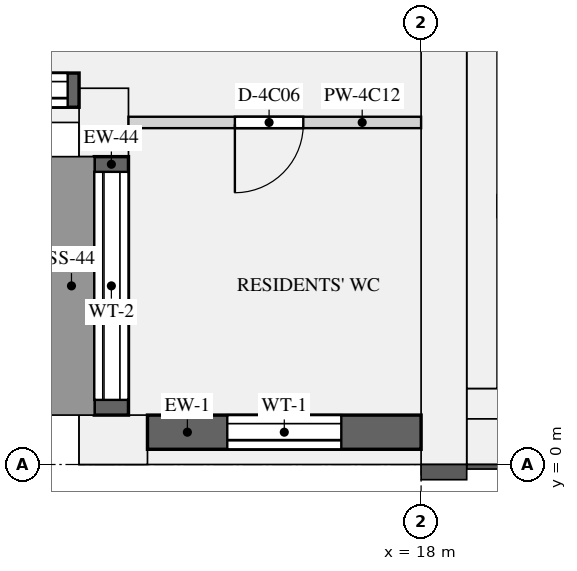
"""IFC4 building model, lengths in metres.
Left out: names, types, materials, properties, quantities, classifications, styles, units other than length and angle.
Written with IfcOpenShell. Run it as: python <this file> out.ifc"""

import sys

from ifc_helpers import new_model, si_unit, direction, frame, frame_2d, origin, origin_2d, place, context, subcontext, project, spatial, rectangle, extrude, element, fill, save


model = new_model("IFC4")
c1 = context("Model", 3, precision=1e-05, world=origin(), true_north=direction((0.0, 1.0)))
c2 = subcontext(c1, "Body", "Model", "MODEL_VIEW")
j1 = project(units=[si_unit("LENGTHUNIT", "METRE"), si_unit("PLANEANGLEUNIT", "RADIAN")], contexts=[c1])
p1 = place(None, origin())
s1 = spatial("IfcSite", under=j1, at=p1, CompositionType="ELEMENT")
p2 = place(p1, origin())
s2 = spatial("IfcBuilding", under=s1, at=p2, CompositionType="ELEMENT")
p3 = place(p2, frame((0.0, 0.0, 216.9)))
s3 = spatial("IfcBuildingStorey", under=s2, at=p3, CompositionType="ELEMENT", Elevation=216.9)
for number, where, z_axis, x_axis in (
    (1, (13.95, 0.325, 0.0), (0.0, 0.0, 1.0), (1.0, 0.0, 0.0)),
    (2, (13.825, 4.5, 0.0), (0.0, 0.0, 1.0), (0.0, -1.0, 0.0)),
):
    element("IfcColumn", number, at=place(p3, frame(where, z_axis=z_axis, x_axis=x_axis)), inside=s3, PredefinedType="USERDEFINED", context=c2, shape_type="SweptSolid", body=[
        extrude(rectangle(XDim=0.9, YDim=0.65, at=origin_2d()), origin(), (0.0, 0.0, 1.0), 3.15),
    ])
p4 = place(p3, frame((18.3, 0.0, 0.0), z_axis=(0.0, 0.0, 1.0), x_axis=(0.0, 1.0, 0.0)))
e3 = element("IfcWall", 3, at=p4, inside=s3, PredefinedType="SHEAR", context=c2, shape_type="SweptSolid", body=[
    extrude(rectangle(XDim=12.5, YDim=0.6, at=frame_2d((6.25, 0.0))), origin(), (0.0, 0.0, 1.0), 3.15),
])
p5 = place(p3, frame((18.6, 0.3, 0.0), z_axis=(0.0, 0.0, 1.0), x_axis=(1.0, 0.0, 0.0)))
e4 = element("IfcWall", 4, at=p5, inside=s3, PredefinedType="SHEAR", context=c2, shape_type="SweptSolid", body=[
    extrude(rectangle(XDim=34.8, YDim=0.6, at=frame_2d((17.4, 0.0))), origin(), (0.0, 0.0, 1.0), 3.15),
])
p6 = place(p3, frame((18.8, 1.0, 0.0), z_axis=(0.0, 0.0, 1.0), x_axis=(0.0, 1.0, 0.0)))
e5 = element("IfcWall", 5, at=p6, inside=s3, PredefinedType="SHEAR", context=c2, shape_type="SweptSolid", body=[
    extrude(rectangle(XDim=10.9, YDim=0.4, at=frame_2d((5.45, 0.0))), origin(), (0.0, 0.0, 1.0), 3.15),
])
p7 = place(p3, frame((18.6, 0.8, 0.0), z_axis=(0.0, 0.0, 1.0), x_axis=(1.0, 0.0, 0.0)))
e6 = element("IfcWall", 6, at=p7, inside=s3, PredefinedType="SHEAR", context=c2, shape_type="SweptSolid", body=[
    extrude(rectangle(XDim=34.8, YDim=0.4, at=frame_2d((17.4, 0.0))), origin(), (0.0, 0.0, 1.0), 3.15),
])
p8 = place(p3, frame((19.0, 3.4, 0.0), z_axis=(0.0, 0.0, 1.0), x_axis=(1.0, 0.0, 0.0)))
e7 = element("IfcWall", 7, at=p8, inside=s3, PredefinedType="SHEAR", context=c2, shape_type="SweptSolid", body=[
    extrude(rectangle(XDim=2.55, YDim=0.3, at=frame_2d((1.275, 0.0))), origin(), (0.0, 0.0, 1.0), 3.15),
])
p9 = place(p8, frame((0.675, 0.0, 0.0)))
e8 = element("IfcOpeningElement", 8, at=p9, cuts=e7, PredefinedType="OPENING", context=c2, shape_type="SweptSolid", body=[
    extrude(rectangle(XDim=1.2, YDim=2.1, at=frame_2d((0.6, 1.05))), frame((0.0, 0.16, 0.0), z_axis=(0.0, -1.0, 0.0), x_axis=(1.0, 0.0, 0.0)), (0.0, 0.0, 1.0), 0.32),
])
p10 = place(p3, frame((14.4, 0.425, 0.9), z_axis=(0.0, 0.0, 1.0), x_axis=(1.0, 0.0, 0.0)))
e9 = element("IfcWall", 9, at=p10, inside=s3, PredefinedType="SOLIDWALL", context=c2, shape_type="SweptSolid", body=[
    extrude(rectangle(XDim=3.6, YDim=0.45, at=frame_2d((1.8, 0.0))), origin(), (0.0, 0.0, 1.0), 1.93),
])
p11 = place(p10, frame((1.05, 0.0, 0.15)))
e10 = element("IfcOpeningElement", 10, at=p11, cuts=e9, PredefinedType="OPENING", context=c2, shape_type="SweptSolid", body=[
    extrude(rectangle(XDim=1.5, YDim=1.5, at=frame_2d((0.75, 0.75))), frame((0.0, 0.235, 0.0), z_axis=(0.0, -1.0, 0.0), x_axis=(1.0, 0.0, 0.0)), (0.0, 0.0, 1.0), 0.47),
])
p12 = place(p3, frame((9.9, 4.925, 0.9), z_axis=(0.0, 0.0, 1.0), x_axis=(1.0, 0.0, 0.0)))
e11 = element("IfcWall", 11, at=p12, inside=s3, PredefinedType="SOLIDWALL", context=c2, shape_type="SweptSolid", body=[
    extrude(rectangle(XDim=3.6, YDim=0.45, at=frame_2d((1.8, 0.0))), origin(), (0.0, 0.0, 1.0), 1.93),
])
p13 = place(p12, frame((0.15, 0.0, 0.15)))
e12 = element("IfcOpeningElement", 12, at=p13, cuts=e11, PredefinedType="OPENING", context=c2, shape_type="SweptSolid", body=[
    extrude(rectangle(XDim=3.3, YDim=1.5, at=frame_2d((1.65, 0.75))), frame((0.0, 0.235, 0.0), z_axis=(0.0, -1.0, 0.0), x_axis=(1.0, 0.0, 0.0)), (0.0, 0.0, 1.0), 0.47),
])
p14 = place(p3, frame((13.925, 4.05, 0.9), z_axis=(0.0, 0.0, 1.0), x_axis=(0.0, -1.0, 0.0)))
e13 = element("IfcWall", 13, at=p14, inside=s3, PredefinedType="SOLIDWALL", context=c2, shape_type="SweptSolid", body=[
    extrude(rectangle(XDim=3.4, YDim=0.45, at=frame_2d((1.7, 0.0))), origin(), (0.0, 0.0, 1.0), 1.93),
])
p15 = place(p14, frame((0.2, 0.0, 0.15)))
e14 = element("IfcOpeningElement", 14, at=p15, cuts=e13, PredefinedType="OPENING", context=c2, shape_type="SweptSolid", body=[
    extrude(rectangle(XDim=3.0, YDim=1.5, at=frame_2d((1.5, 0.75))), frame((0.0, 0.235, 0.0), z_axis=(0.0, -1.0, 0.0), x_axis=(1.0, 0.0, 0.0)), (0.0, 0.0, 1.0), 0.47),
])
p16 = place(p3, frame((14.15, 4.5, 0.0), z_axis=(0.0, 0.0, 1.0), x_axis=(1.0, 0.0, 0.0)))
e15 = element("IfcWall", 15, at=p16, inside=s3, PredefinedType="PARTITIONING", context=c2, shape_type="SweptSolid", body=[
    extrude(rectangle(XDim=3.85, YDim=0.15, at=frame_2d((1.925, 0.0))), origin(), (0.0, 0.0, 1.0), 2.83),
])
p17 = place(p16, frame((1.4, 0.0, 0.0)))
e16 = element("IfcOpeningElement", 16, at=p17, cuts=e15, PredefinedType="OPENING", context=c2, shape_type="SweptSolid", body=[
    extrude(rectangle(XDim=0.9, YDim=2.1, at=frame_2d((0.45, 1.05))), frame((0.0, 0.085, 0.0), z_axis=(0.0, -1.0, 0.0), x_axis=(1.0, 0.0, 0.0)), (0.0, 0.0, 1.0), 0.17),
])
p18 = place(p11, origin())
e17 = element("IfcWindow", 17, at=p18, inside=s3, PartitioningType="SINGLE_PANEL", PredefinedType="WINDOW", context=c2, shape_type="SweptSolid", body=[
    extrude(rectangle(XDim=1.5, YDim=1.5, at=frame_2d((0.75, 0.75))), frame((0.0, -0.065, 0.0), z_axis=(0.0, -1.0, 0.0), x_axis=(1.0, 0.0, 0.0)), (0.0, 0.0, 1.0), 0.06),
])
fill(e10, e17)
p19 = place(p13, origin())
e18 = element("IfcWindow", 18, at=p19, inside=s3, PartitioningType="SINGLE_PANEL", PredefinedType="WINDOW", context=c2, shape_type="SweptSolid", body=[
    extrude(rectangle(XDim=3.3, YDim=1.5, at=frame_2d((1.65, 0.75))), frame((0.0, -0.065, 0.0), z_axis=(0.0, -1.0, 0.0), x_axis=(1.0, 0.0, 0.0)), (0.0, 0.0, 1.0), 0.06),
])
fill(e12, e18)
p20 = place(p15, origin())
e19 = element("IfcWindow", 19, at=p20, inside=s3, PartitioningType="SINGLE_PANEL", PredefinedType="WINDOW", context=c2, shape_type="SweptSolid", body=[
    extrude(rectangle(XDim=3.0, YDim=1.5, at=frame_2d((1.5, 0.75))), frame((0.0, -0.065, 0.0), z_axis=(0.0, -1.0, 0.0), x_axis=(1.0, 0.0, 0.0)), (0.0, 0.0, 1.0), 0.06),
])
fill(e14, e19)
p21 = place(p17, frame((0.9, 0.0, 0.0), z_axis=(0.0, 0.0, 1.0), x_axis=(-1.0, 0.0, 0.0)))
e20 = element("IfcDoor", 20, at=p21, inside=s3, OperationType="SINGLE_SWING_RIGHT", PredefinedType="DOOR", context=c2, shape_type="SweptSolid", body=[
    extrude(rectangle(XDim=0.9, YDim=2.1, at=frame_2d((0.45, 1.05))), frame((0.0, 0.025, 0.0), z_axis=(0.0, -1.0, 0.0), x_axis=(1.0, 0.0, 0.0)), (0.0, 0.0, 1.0), 0.05),
])
fill(e16, e20)
save(model, sys.argv[1])
